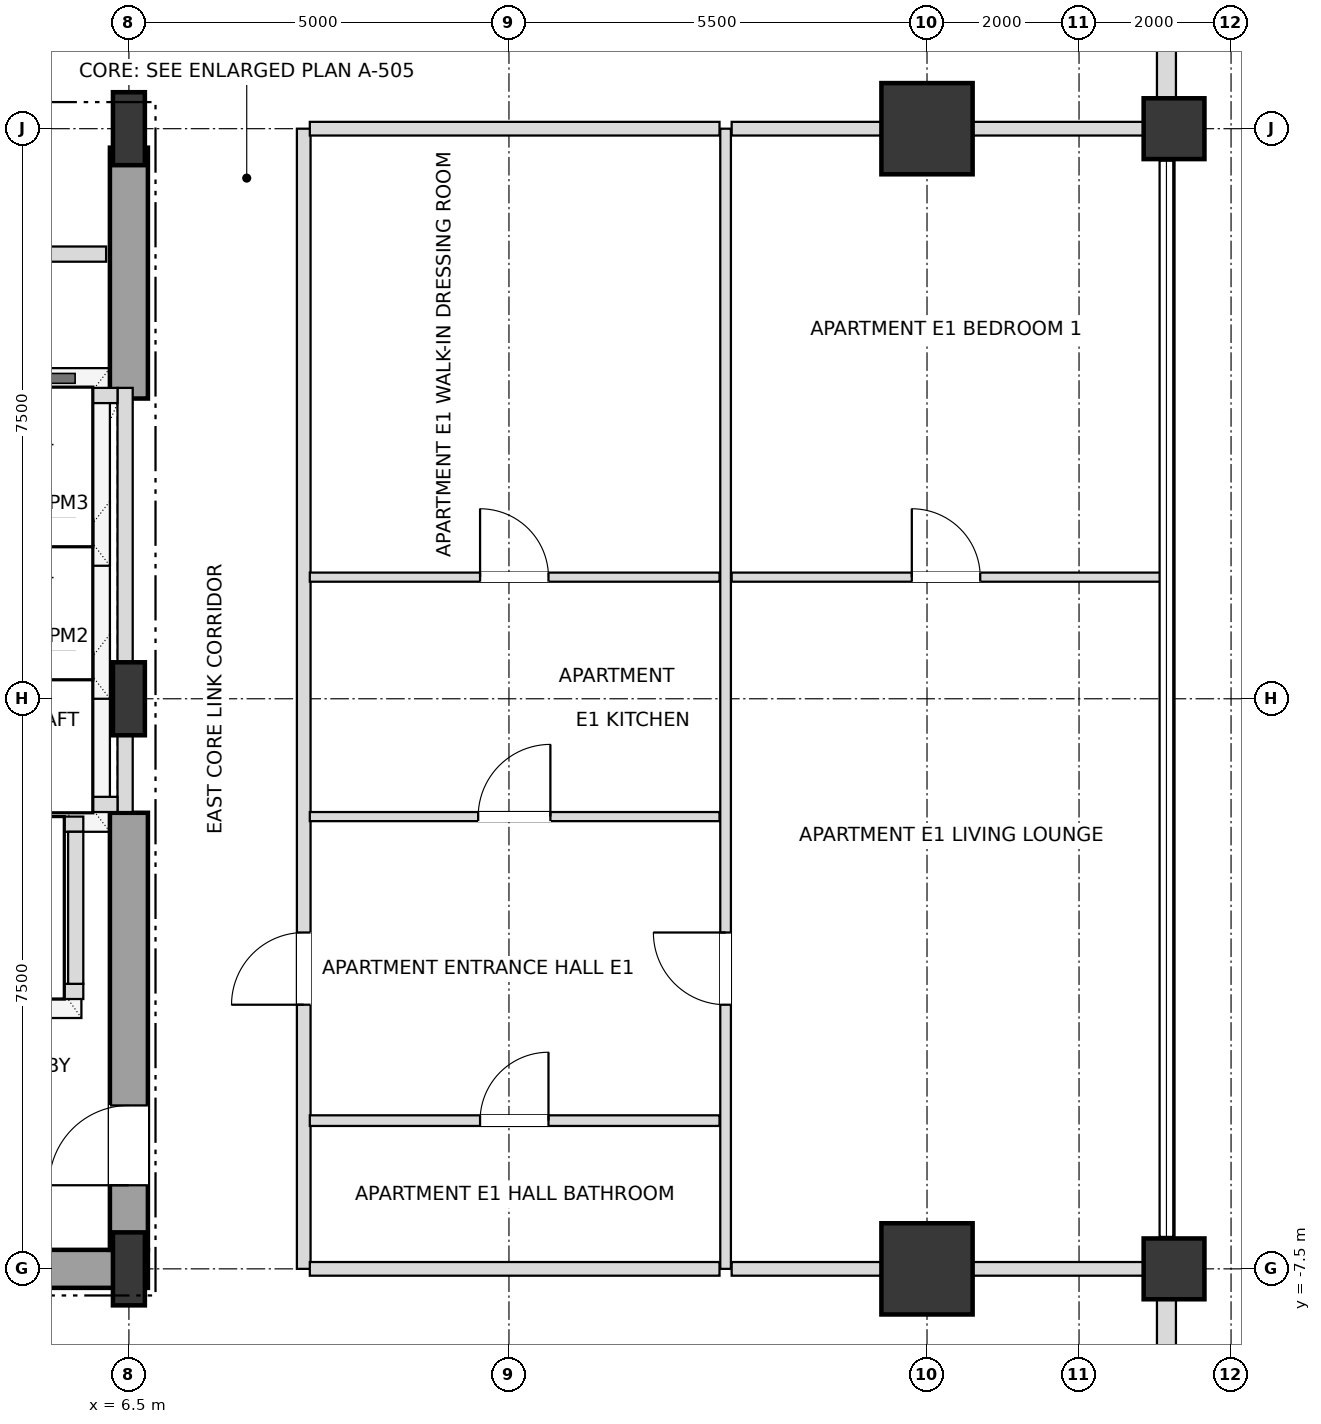
"""IFC4 building model, lengths in metres.
Left out: names, types, materials, properties, quantities, classifications, styles, units other than length and angle.
Written with IfcOpenShell. Run it as: python <this file> out.ifc"""

import sys

from ifc_helpers import new_model, si_unit, direction, frame, frame_2d, origin, origin_2d, place, context, subcontext, project, spatial, rectangle, i_section, extrude, element, fill, save


model = new_model("IFC4")
c1 = context("Model", 3, precision=1e-05, world=origin(), true_north=direction((0.0, 1.0)))
c2 = subcontext(c1, "Body", "Model", "MODEL_VIEW")
j1 = project(units=[si_unit("LENGTHUNIT", "METRE"), si_unit("PLANEANGLEUNIT", "RADIAN")], contexts=[c1])
p1 = place(None, origin())
s1 = spatial("IfcSite", under=j1, at=p1, CompositionType="ELEMENT")
p2 = place(p1, origin())
s2 = spatial("IfcBuilding", under=s1, at=p2, CompositionType="ELEMENT")
p3 = place(p2, frame((0.0, 0.0, 158.4)))
s3 = spatial("IfcBuildingStorey", under=s2, at=p3, CompositionType="ELEMENT", Elevation=158.4)
for number, where, z_axis, x_axis in (
    (1, (6.5, -7.5, 0.0), (0.0, 0.0, 1.0), (1.0, 0.0, 0.0)),
    (2, (6.5, 0.0, 0.0), (0.0, 0.0, 1.0), (1.0, 0.0, 0.0)),
    (3, (6.5, 7.5, 0.0), (0.0, 0.0, 1.0), (1.0, 0.0, 0.0)),
):
    element("IfcColumn", number, at=place(p3, frame(where, z_axis=z_axis, x_axis=x_axis)), inside=s3, PredefinedType="COLUMN", context=c2, shape_type="SweptSolid", body=[
        extrude(i_section(OverallWidth=0.42, OverallDepth=0.96, WebThickness=0.022, FlangeThickness=0.034, at=origin_2d()), origin(), (0.0, 0.0, 1.0), 3.6),
    ])
for number, where, z_axis, x_axis in (
    (4, (17.0, -7.5, 0.0), (0.0, 0.0, 1.0), (1.0, 0.0, 0.0)),
    (5, (17.0, 7.5, 0.0), (0.0, 0.0, 1.0), (1.0, 0.0, 0.0)),
):
    element("IfcColumn", number, at=place(p3, frame(where, z_axis=z_axis, x_axis=x_axis)), inside=s3, PredefinedType="USERDEFINED", context=c2, shape_type="SweptSolid", body=[
        extrude(rectangle(XDim=1.2, YDim=1.2, at=origin_2d()), origin(), (0.0, 0.0, 1.0), 3.6),
    ])
for number, where, z_axis, x_axis in (
    (6, (20.25, -7.5, 0.0), (0.0, 0.0, 1.0), (1.0, 0.0, 0.0)),
    (7, (20.25, 7.5, 0.0), (0.0, 0.0, 1.0), (1.0, 0.0, 0.0)),
):
    element("IfcColumn", number, at=place(p3, frame(where, z_axis=z_axis, x_axis=x_axis)), inside=s3, PredefinedType="COLUMN", context=c2, shape_type="SweptSolid", body=[
        extrude(rectangle(XDim=0.8, YDim=0.8, at=origin_2d()), origin(), (0.0, 0.0, 1.0), 3.6),
    ])
p4 = place(p3, frame((20.15, -12.605, 0.0), z_axis=(0.0, 0.0, 1.0), x_axis=(0.0, 1.0, 0.0)))
e8 = element("IfcWall", 8, at=p4, inside=s3, PredefinedType="SOLIDWALL", context=c2, shape_type="SweptSolid", body=[
    extrude(rectangle(XDim=4.71, YDim=0.25, at=frame_2d((2.355, 0.0))), origin(), (0.0, 0.0, 1.0), 2.736),
])
p5 = place(p4, frame((1.455, 0.0, 0.72)))
e9 = element("IfcOpeningElement", 9, at=p5, cuts=e8, PredefinedType="OPENING", context=c2, shape_type="SweptSolid", body=[
    extrude(rectangle(XDim=1.8, YDim=1.68, at=frame_2d((0.9, 0.84))), frame((0.0, 0.135, 0.0), z_axis=(0.0, -1.0, 0.0), x_axis=(1.0, 0.0, 0.0)), (0.0, 0.0, 1.0), 0.27),
])
p6 = place(p3, frame((20.15, 7.895, 0.0), z_axis=(0.0, 0.0, 1.0), x_axis=(0.0, 1.0, 0.0)))
e10 = element("IfcWall", 10, at=p6, inside=s3, PredefinedType="SOLIDWALL", context=c2, shape_type="SweptSolid", body=[
    extrude(rectangle(XDim=4.71, YDim=0.25, at=frame_2d((2.355, 0.0))), origin(), (0.0, 0.0, 1.0), 2.736),
])
p7 = place(p6, frame((1.455, 0.0, 0.72)))
e11 = element("IfcOpeningElement", 11, at=p7, cuts=e10, PredefinedType="OPENING", context=c2, shape_type="SweptSolid", body=[
    extrude(rectangle(XDim=1.8, YDim=1.68, at=frame_2d((0.9, 0.84))), frame((0.0, 0.135, 0.0), z_axis=(0.0, -1.0, 0.0), x_axis=(1.0, 0.0, 0.0)), (0.0, 0.0, 1.0), 0.27),
])
p8 = place(p3, frame((0.0, -7.5, 0.0), z_axis=(0.0, 0.0, 1.0), x_axis=(1.0, 0.0, 0.0)))
e12 = element("IfcWall", 12, at=p8, inside=s3, PredefinedType="SHEAR", context=c2, shape_type="SweptSolid", body=[
    extrude(rectangle(XDim=6.75, YDim=0.5, at=frame_2d((3.375, 0.0))), origin(), (0.0, 0.0, 1.0), 3.38),
])
p9 = place(p3, frame((6.5, -7.25, 0.0), z_axis=(0.0, 0.0, 1.0), x_axis=(0.0, 1.0, 0.0)))
e13 = element("IfcWall", 13, at=p9, inside=s3, PredefinedType="SHEAR", context=c2, shape_type="SweptSolid", body=[
    extrude(rectangle(XDim=5.75, YDim=0.5, at=frame_2d((2.875, 0.0))), origin(), (0.0, 0.0, 1.0), 3.38),
])
p10 = place(p9, frame((0.85, 0.0, 0.0)))
e14 = element("IfcOpeningElement", 14, at=p10, cuts=e13, PredefinedType="OPENING", context=c2, shape_type="SweptSolid", body=[
    extrude(rectangle(XDim=1.05, YDim=2.15, at=frame_2d((0.525, 1.075))), frame((0.0, 0.26, 0.0), z_axis=(0.0, -1.0, 0.0), x_axis=(1.0, 0.0, 0.0)), (0.0, 0.0, 1.0), 0.52),
])
p11 = place(p3, frame((6.5, 3.95, 0.0), z_axis=(0.0, 0.0, 1.0), x_axis=(0.0, 1.0, 0.0)))
e15 = element("IfcWall", 15, at=p11, inside=s3, PredefinedType="SHEAR", context=c2, shape_type="SweptSolid", body=[
    extrude(rectangle(XDim=3.3, YDim=0.5, at=frame_2d((1.65, 0.0))), origin(), (0.0, 0.0, 1.0), 3.38),
])
p12 = place(p3, frame((6.45, -1.49, 0.0), z_axis=(0.0, 0.0, 1.0), x_axis=(0.0, 1.0, 0.0)))
e16 = element("IfcWall", 16, at=p12, inside=s3, PredefinedType="SOLIDWALL", context=c2, shape_type="SweptSolid", body=[
    extrude(rectangle(XDim=5.58, YDim=0.2, at=frame_2d((2.79, 0.0))), origin(), (0.0, 0.0, 1.0), 2.816),
])
for number, where, z_axis, x_axis in (
    (17, (4.15, -1.39, 0.0), (0.0, 0.0, 1.0), (1.0, 0.0, 0.0)),
    (18, (4.15, 3.99, 0.0), (0.0, 0.0, 1.0), (1.0, 0.0, 0.0)),
):
    element("IfcWall", number, at=place(p3, frame(where, z_axis=z_axis, x_axis=x_axis)), inside=s3, PredefinedType="SOLIDWALL", context=c2, shape_type="SweptSolid", body=[
        extrude(rectangle(XDim=2.2, YDim=0.2, at=frame_2d((1.1, 0.0))), origin(), (0.0, 0.0, 1.0), 3.38),
    ])
p13 = place(p3, frame((1.8, -3.85, 0.0), z_axis=(0.0, 0.0, 1.0), x_axis=(1.0, 0.0, 0.0)))
e19 = element("IfcWall", 19, at=p13, inside=s3, PredefinedType="SOLIDWALL", context=c2, shape_type="SweptSolid", body=[
    extrude(rectangle(XDim=4.1, YDim=0.2, at=frame_2d((2.05, 0.0))), origin(), (0.0, 0.0, 1.0), 3.38),
])
p14 = place(p13, frame((0.45, 0.0, 0.0)))
e20 = element("IfcOpeningElement", 20, at=p14, cuts=e19, PredefinedType="OPENING", context=c2, shape_type="SweptSolid", body=[
    extrude(rectangle(XDim=1.2, YDim=2.2, at=frame_2d((0.6, 1.1))), frame((0.0, 0.11, 0.0), z_axis=(0.0, -1.0, 0.0), x_axis=(1.0, 0.0, 0.0)), (0.0, 0.0, 1.0), 0.22),
])
p15 = place(p13, frame((2.45, 0.0, 0.0)))
e21 = element("IfcOpeningElement", 21, at=p15, cuts=e19, PredefinedType="OPENING", context=c2, shape_type="SweptSolid", body=[
    extrude(rectangle(XDim=1.2, YDim=2.2, at=frame_2d((0.6, 1.1))), frame((0.0, 0.11, 0.0), z_axis=(0.0, -1.0, 0.0), x_axis=(1.0, 0.0, 0.0)), (0.0, 0.0, 1.0), 0.22),
])
p16 = place(p3, frame((1.8, -1.65, 0.0), z_axis=(0.0, 0.0, 1.0), x_axis=(1.0, 0.0, 0.0)))
e22 = element("IfcWall", 22, at=p16, inside=s3, PredefinedType="SOLIDWALL", context=c2, shape_type="SweptSolid", body=[
    extrude(rectangle(XDim=4.1, YDim=0.2, at=frame_2d((2.05, 0.0))), origin(), (0.0, 0.0, 1.0), 3.38),
])
p17 = place(p3, frame((5.8, -3.75, 0.0), z_axis=(0.0, 0.0, 1.0), x_axis=(0.0, 1.0, 0.0)))
e23 = element("IfcWall", 23, at=p17, inside=s3, PredefinedType="SOLIDWALL", context=c2, shape_type="SweptSolid", body=[
    extrude(rectangle(XDim=2.0, YDim=0.2, at=frame_2d((1.0, 0.0))), origin(), (0.0, 0.0, 1.0), 3.38),
])
p18 = place(p3, frame((8.8, -7.5, 0.0), z_axis=(0.0, 0.0, 1.0), x_axis=(0.0, 1.0, 0.0)))
e24 = element("IfcWall", 24, at=p18, inside=s3, PredefinedType="PARTITIONING", context=c2, shape_type="SweptSolid", body=[
    extrude(rectangle(XDim=15.0, YDim=0.18, at=frame_2d((7.5, 0.0))), origin(), (0.0, 0.0, 1.0), 3.38),
])
p19 = place(p18, frame((3.475, 0.0, 0.0)))
e25 = element("IfcOpeningElement", 25, at=p19, cuts=e24, PredefinedType="OPENING", context=c2, shape_type="SweptSolid", body=[
    extrude(rectangle(XDim=0.95, YDim=2.15, at=frame_2d((0.475, 1.075))), frame((0.0, 0.1, 0.0), z_axis=(0.0, -1.0, 0.0), x_axis=(1.0, 0.0, 0.0)), (0.0, 0.0, 1.0), 0.2),
])
p20 = place(p3, frame((14.35, -7.5, 0.0), z_axis=(0.0, 0.0, 1.0), x_axis=(0.0, 1.0, 0.0)))
e26 = element("IfcWall", 26, at=p20, inside=s3, PredefinedType="PARTITIONING", context=c2, shape_type="SweptSolid", body=[
    extrude(rectangle(XDim=15.0, YDim=0.14, at=frame_2d((7.5, 0.0))), origin(), (0.0, 0.0, 1.0), 3.38),
])
p21 = place(p20, frame((3.475, 0.0, 0.0)))
e27 = element("IfcOpeningElement", 27, at=p21, cuts=e26, PredefinedType="OPENING", context=c2, shape_type="SweptSolid", body=[
    extrude(rectangle(XDim=0.95, YDim=2.1, at=frame_2d((0.475, 1.05))), frame((0.0, 0.08, 0.0), z_axis=(0.0, -1.0, 0.0), x_axis=(1.0, 0.0, 0.0)), (0.0, 0.0, 1.0), 0.16),
])
p22 = place(p3, frame((8.88, -7.5, 0.0), z_axis=(0.0, 0.0, 1.0), x_axis=(1.0, 0.0, 0.0)))
e28 = element("IfcWall", 28, at=p22, inside=s3, PredefinedType="PARTITIONING", context=c2, shape_type="SweptSolid", body=[
    extrude(rectangle(XDim=5.39, YDim=0.18, at=frame_2d((2.695, 0.0))), origin(), (0.0, 0.0, 1.0), 2.816),
])
p23 = place(p3, frame((14.43, -7.5, 0.0), z_axis=(0.0, 0.0, 1.0), x_axis=(1.0, 0.0, 0.0)))
e29 = element("IfcWall", 29, at=p23, inside=s3, PredefinedType="PARTITIONING", context=c2, shape_type="SweptSolid", body=[
    extrude(rectangle(XDim=5.72, YDim=0.18, at=frame_2d((2.86, 0.0))), origin(), (0.0, 0.0, 1.0), 2.816),
])
p24 = place(p3, frame((8.88, -5.55, 0.0), z_axis=(0.0, 0.0, 1.0), x_axis=(1.0, 0.0, 0.0)))
e30 = element("IfcWall", 30, at=p24, inside=s3, PredefinedType="PARTITIONING", context=c2, shape_type="SweptSolid", body=[
    extrude(rectangle(XDim=5.39, YDim=0.14, at=frame_2d((2.695, 0.0))), origin(), (0.0, 0.0, 1.0), 3.38),
])
p25 = place(p24, frame((2.24, 0.0, 0.0)))
e31 = element("IfcOpeningElement", 31, at=p25, cuts=e30, PredefinedType="OPENING", context=c2, shape_type="SweptSolid", body=[
    extrude(rectangle(XDim=0.9, YDim=2.1, at=frame_2d((0.45, 1.05))), frame((0.0, 0.08, 0.0), z_axis=(0.0, -1.0, 0.0), x_axis=(1.0, 0.0, 0.0)), (0.0, 0.0, 1.0), 0.16),
])
p26 = place(p3, frame((8.88, -1.55, 0.0), z_axis=(0.0, 0.0, 1.0), x_axis=(1.0, 0.0, 0.0)))
e32 = element("IfcWall", 32, at=p26, inside=s3, PredefinedType="PARTITIONING", context=c2, shape_type="SweptSolid", body=[
    extrude(rectangle(XDim=5.39, YDim=0.12, at=frame_2d((2.695, 0.0))), origin(), (0.0, 0.0, 1.0), 3.38),
])
p27 = place(p26, frame((2.215, 0.0, 0.0)))
e33 = element("IfcOpeningElement", 33, at=p27, cuts=e32, PredefinedType="OPENING", context=c2, shape_type="SweptSolid", body=[
    extrude(rectangle(XDim=0.95, YDim=2.1, at=frame_2d((0.475, 1.05))), frame((0.0, 0.07, 0.0), z_axis=(0.0, -1.0, 0.0), x_axis=(1.0, 0.0, 0.0)), (0.0, 0.0, 1.0), 0.14),
])
p28 = place(p3, frame((8.88, 1.6, 0.0), z_axis=(0.0, 0.0, 1.0), x_axis=(1.0, 0.0, 0.0)))
e34 = element("IfcWall", 34, at=p28, inside=s3, PredefinedType="PARTITIONING", context=c2, shape_type="SweptSolid", body=[
    extrude(rectangle(XDim=5.39, YDim=0.12, at=frame_2d((2.695, 0.0))), origin(), (0.0, 0.0, 1.0), 3.38),
])
p29 = place(p28, frame((2.24, 0.0, 0.0)))
e35 = element("IfcOpeningElement", 35, at=p29, cuts=e34, PredefinedType="OPENING", context=c2, shape_type="SweptSolid", body=[
    extrude(rectangle(XDim=0.9, YDim=2.1, at=frame_2d((0.45, 1.05))), frame((0.0, 0.07, 0.0), z_axis=(0.0, -1.0, 0.0), x_axis=(1.0, 0.0, 0.0)), (0.0, 0.0, 1.0), 0.14),
])
p30 = place(p3, frame((14.43, 1.6, 0.0), z_axis=(0.0, 0.0, 1.0), x_axis=(1.0, 0.0, 0.0)))
e36 = element("IfcWall", 36, at=p30, inside=s3, PredefinedType="PARTITIONING", context=c2, shape_type="SweptSolid", body=[
    extrude(rectangle(XDim=5.64, YDim=0.12, at=frame_2d((2.82, 0.0))), origin(), (0.0, 0.0, 1.0), 2.816),
])
p31 = place(p30, frame((2.37, 0.0, 0.0)))
e37 = element("IfcOpeningElement", 37, at=p31, cuts=e36, PredefinedType="OPENING", context=c2, shape_type="SweptSolid", body=[
    extrude(rectangle(XDim=0.9, YDim=2.1, at=frame_2d((0.45, 1.05))), frame((0.0, 0.07, 0.0), z_axis=(0.0, -1.0, 0.0), x_axis=(1.0, 0.0, 0.0)), (0.0, 0.0, 1.0), 0.14),
])
p32 = place(p3, frame((4.13, 5.85, 0.0), z_axis=(0.0, 0.0, 1.0), x_axis=(1.0, 0.0, 0.0)))
e38 = element("IfcWall", 38, at=p32, inside=s3, PredefinedType="SOLIDWALL", context=c2, shape_type="SweptSolid", body=[
    extrude(rectangle(XDim=2.07, YDim=0.2, at=frame_2d((1.035, 0.0))), origin(), (0.0, 0.0, 1.0), 3.38),
])
p33 = place(p3, frame((8.88, 7.5, 0.0), z_axis=(0.0, 0.0, 1.0), x_axis=(1.0, 0.0, 0.0)))
e39 = element("IfcWall", 39, at=p33, inside=s3, PredefinedType="PARTITIONING", context=c2, shape_type="SweptSolid", body=[
    extrude(rectangle(XDim=5.39, YDim=0.18, at=frame_2d((2.695, 0.0))), origin(), (0.0, 0.0, 1.0), 2.816),
])
p34 = place(p3, frame((14.43, 7.5, 0.0), z_axis=(0.0, 0.0, 1.0), x_axis=(1.0, 0.0, 0.0)))
e40 = element("IfcWall", 40, at=p34, inside=s3, PredefinedType="PARTITIONING", context=c2, shape_type="SweptSolid", body=[
    extrude(rectangle(XDim=5.72, YDim=0.18, at=frame_2d((2.86, 0.0))), origin(), (0.0, 0.0, 1.0), 2.816),
])
p35 = place(p10, origin())
e41 = element("IfcDoor", 41, at=p35, inside=s3, OperationType="SINGLE_SWING_LEFT", PredefinedType="DOOR", context=c2, shape_type="SweptSolid", body=[
    extrude(rectangle(XDim=1.05, YDim=2.15, at=frame_2d((0.525, 1.075))), frame((0.0, 0.025, 0.0), z_axis=(0.0, -1.0, 0.0), x_axis=(1.0, 0.0, 0.0)), (0.0, 0.0, 1.0), 0.05),
])
fill(e14, e41)
p36 = place(p25, origin())
e42 = element("IfcDoor", 42, at=p36, inside=s3, OperationType="SINGLE_SWING_RIGHT", PredefinedType="DOOR", context=c2, shape_type="SweptSolid", body=[
    extrude(rectangle(XDim=0.9, YDim=2.1, at=frame_2d((0.45, 1.05))), frame((0.0, 0.025, 0.0), z_axis=(0.0, -1.0, 0.0), x_axis=(1.0, 0.0, 0.0)), (0.0, 0.0, 1.0), 0.05),
])
fill(e31, e42)
p37 = place(p19, origin())
e43 = element("IfcDoor", 43, at=p37, inside=s3, OperationType="SINGLE_SWING_LEFT", PredefinedType="DOOR", context=c2, shape_type="SweptSolid", body=[
    extrude(rectangle(XDim=0.95, YDim=2.15, at=frame_2d((0.475, 1.075))), frame((0.0, 0.025, 0.0), z_axis=(0.0, -1.0, 0.0), x_axis=(1.0, 0.0, 0.0)), (0.0, 0.0, 1.0), 0.05),
])
fill(e25, e43)
p38 = place(p27, origin())
e44 = element("IfcDoor", 44, at=p38, inside=s3, OperationType="SINGLE_SWING_RIGHT", PredefinedType="DOOR", context=c2, shape_type="SweptSolid", body=[
    extrude(rectangle(XDim=0.95, YDim=2.1, at=frame_2d((0.475, 1.05))), frame((0.0, 0.025, 0.0), z_axis=(0.0, -1.0, 0.0), x_axis=(1.0, 0.0, 0.0)), (0.0, 0.0, 1.0), 0.05),
])
fill(e33, e44)
p39 = place(p29, origin())
e45 = element("IfcDoor", 45, at=p39, inside=s3, OperationType="SINGLE_SWING_LEFT", PredefinedType="DOOR", context=c2, shape_type="SweptSolid", body=[
    extrude(rectangle(XDim=0.9, YDim=2.1, at=frame_2d((0.45, 1.05))), frame((0.0, 0.025, 0.0), z_axis=(0.0, -1.0, 0.0), x_axis=(1.0, 0.0, 0.0)), (0.0, 0.0, 1.0), 0.05),
])
fill(e35, e45)
p40 = place(p21, origin())
e46 = element("IfcDoor", 46, at=p40, inside=s3, OperationType="SINGLE_SWING_RIGHT", PredefinedType="DOOR", context=c2, shape_type="SweptSolid", body=[
    extrude(rectangle(XDim=0.95, YDim=2.1, at=frame_2d((0.475, 1.05))), frame((0.0, 0.025, 0.0), z_axis=(0.0, -1.0, 0.0), x_axis=(1.0, 0.0, 0.0)), (0.0, 0.0, 1.0), 0.05),
])
fill(e27, e46)
p41 = place(p31, origin())
e47 = element("IfcDoor", 47, at=p41, inside=s3, OperationType="SINGLE_SWING_LEFT", PredefinedType="DOOR", context=c2, shape_type="SweptSolid", body=[
    extrude(rectangle(XDim=0.9, YDim=2.1, at=frame_2d((0.45, 1.05))), frame((0.0, 0.025, 0.0), z_axis=(0.0, -1.0, 0.0), x_axis=(1.0, 0.0, 0.0)), (0.0, 0.0, 1.0), 0.05),
])
fill(e37, e47)
save(model, sys.argv[1])
